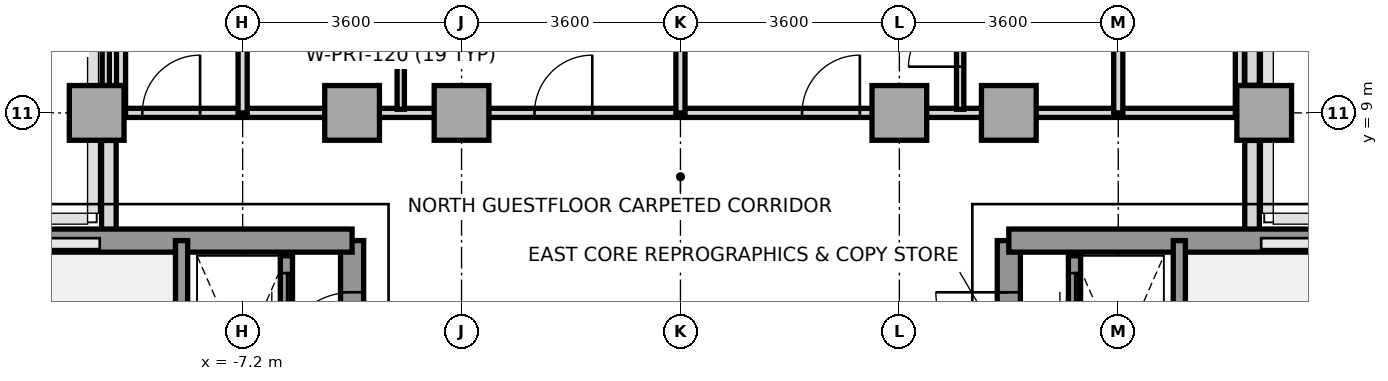
"""IFC4 building model, lengths in metres.
Left out: names, types, materials, properties, quantities, classifications, styles, units other than length and angle.
Written with IfcOpenShell. Run it as: python <this file> out.ifc"""

import sys

from ifc_helpers import new_model, si_unit, direction, frame, frame_2d, origin, origin_2d, place, context, subcontext, project, spatial, rectangle, extrude, source, transform, mapped, element, fill, save


model = new_model("IFC4")
c1 = context("Model", 3, precision=1e-05, world=origin(), true_north=direction((0.0, 1.0)))
c2 = subcontext(c1, "Body", "Model", "MODEL_VIEW")
j1 = project(units=[si_unit("LENGTHUNIT", "METRE"), si_unit("PLANEANGLEUNIT", "RADIAN")], contexts=[c1])
p1 = place(None, origin())
s1 = spatial("IfcSite", under=j1, at=p1, CompositionType="ELEMENT")
p2 = place(p1, origin())
s2 = spatial("IfcBuilding", under=s1, at=p2, CompositionType="ELEMENT")
p3 = place(p2, frame((0.0, 0.0, 187.6)))
s3 = spatial("IfcBuildingStorey", under=s2, at=p3, CompositionType="ELEMENT", Elevation=187.6)
m1 = source(origin(), c2, "Body", "SweptSolid", [
    extrude(rectangle(XDim=0.9, YDim=0.9, at=origin_2d()), origin(), (0.0, 0.0, 1.0), 3.2),
])
for number, where, z_axis, x_axis in (
    (1, (-9.6, 9.0, 0.0), (0.0, 0.0, 1.0), (1.0, 0.0, 0.0)),
    (2, (-5.4, 9.0, 0.0), (0.0, 0.0, 1.0), (1.0, 0.0, 0.0)),
    (3, (-3.6, 9.0, 0.0), (0.0, 0.0, 1.0), (1.0, 0.0, 0.0)),
    (4, (3.6, 9.0, 0.0), (0.0, 0.0, 1.0), (1.0, 0.0, 0.0)),
    (5, (5.4, 9.0, 0.0), (0.0, 0.0, 1.0), (1.0, 0.0, 0.0)),
    (6, (9.6, 9.0, 0.0), (0.0, 0.0, 1.0), (1.0, 0.0, 0.0)),
):
    element("IfcColumn", number, at=place(p3, frame(where, z_axis=z_axis, x_axis=x_axis)), inside=s3, PredefinedType="COLUMN", context=c2, shape_type="MappedRepresentation", body=[
        mapped(m1, transform((0.0, 0.0, 0.0), x_axis=(1.0, 0.0, 0.0), y_axis=(0.0, 1.0, 0.0), z_axis=(0.0, 0.0, 1.0), scale=1.0)),
    ])
p4 = place(p3, frame((-9.4, 6.953, 0.0), z_axis=(0.0, 0.0, 1.0), x_axis=(0.0, 1.0, 0.0)))
e7 = element("IfcWall", 7, at=p4, inside=s3, PredefinedType="PARAPET", context=c2, shape_type="SweptSolid", body=[
    extrude(rectangle(XDim=1.594, YDim=0.24, at=frame_2d((0.797, 0.0))), origin(), (0.0, 0.0, 1.0), 1.15),
])
p5 = place(p3, frame((9.4, 15.358, 0.0), z_axis=(0.0, 0.0, 1.0), x_axis=(0.0, -1.0, 0.0)))
e8 = element("IfcWall", 8, at=p5, inside=s3, PredefinedType="PARAPET", context=c2, shape_type="SweptSolid", body=[
    extrude(rectangle(XDim=5.905, YDim=0.24, at=frame_2d((2.952, 0.0))), origin(), (0.0, 0.0, 1.0), 1.15),
])
p6 = place(p3, frame((9.4, 8.547, 0.0), z_axis=(0.0, 0.0, 1.0), x_axis=(0.0, -1.0, 0.0)))
e9 = element("IfcWall", 9, at=p6, inside=s3, PredefinedType="PARAPET", context=c2, shape_type="SweptSolid", body=[
    extrude(rectangle(XDim=1.594, YDim=0.24, at=frame_2d((0.797, 0.0))), origin(), (0.0, 0.0, 1.0), 1.15),
])
p7 = place(p3, frame((-5.4, -5.6, 0.0), z_axis=(0.0, 0.0, 1.0), x_axis=(0.0, 1.0, 0.0)))
e10 = element("IfcWall", 10, at=p7, inside=s3, PredefinedType="SHEAR", context=c2, shape_type="SweptSolid", body=[
    extrude(rectangle(XDim=12.5, YDim=0.38, at=frame_2d((6.25, 0.0))), origin(), (0.0, 0.0, 1.0), 3.2),
])
p8 = place(p7, frame((4.55, 0.0, 0.0)))
e11 = element("IfcOpeningElement", 11, at=p8, cuts=e10, PredefinedType="OPENING", context=c2, shape_type="SweptSolid", body=[
    extrude(rectangle(XDim=1.2, YDim=2.2, at=frame_2d((0.6, 1.1))), frame((0.0, 0.2, 0.0), z_axis=(0.0, -1.0, 0.0), x_axis=(1.0, 0.0, 0.0)), (0.0, 0.0, 1.0), 0.4),
])
p9 = place(p7, frame((10.45, 0.0, 0.0)))
e12 = element("IfcOpeningElement", 12, at=p9, cuts=e10, PredefinedType="OPENING", context=c2, shape_type="SweptSolid", body=[
    extrude(rectangle(XDim=1.2, YDim=2.2, at=frame_2d((0.6, 1.1))), frame((0.0, 0.2, 0.0), z_axis=(0.0, -1.0, 0.0), x_axis=(1.0, 0.0, 0.0)), (0.0, 0.0, 1.0), 0.4),
])
p10 = place(p7, frame((6.86, 0.0, 0.0)))
e13 = element("IfcOpeningElement", 13, at=p10, cuts=e10, PredefinedType="OPENING", context=c2, shape_type="SweptSolid", body=[
    extrude(rectangle(XDim=0.8, YDim=2.1, at=frame_2d((0.4, 1.05))), frame((0.0, 0.2, 0.0), z_axis=(0.0, -1.0, 0.0), x_axis=(1.0, 0.0, 0.0)), (0.0, 0.0, 1.0), 0.4),
])
p11 = place(p3, frame((-11.356, 6.9, 0.0), z_axis=(0.0, 0.0, 1.0), x_axis=(1.0, 0.0, 0.0)))
e14 = element("IfcWall", 14, at=p11, inside=s3, PredefinedType="SHEAR", context=c2, shape_type="SweptSolid", body=[
    extrude(rectangle(XDim=5.956, YDim=0.38, at=frame_2d((2.978, 0.0))), origin(), (0.0, 0.0, 1.0), 3.2),
])
p12 = place(p3, frame((-8.204, -0.016, 0.0), z_axis=(0.0, 0.0, 1.0), x_axis=(0.0, 1.0, 0.0)))
e15 = element("IfcWall", 15, at=p12, inside=s3, PredefinedType="SOLIDWALL", context=c2, shape_type="SweptSolid", body=[
    extrude(rectangle(XDim=6.916, YDim=0.2, at=frame_2d((3.458, 0.0))), origin(), (0.0, 0.0, 1.0), 3.2),
])
p13 = place(p12, frame((0.2, 0.0, 0.0)))
e16 = element("IfcOpeningElement", 16, at=p13, cuts=e15, PredefinedType="OPENING", context=c2, shape_type="SweptSolid", body=[
    extrude(rectangle(XDim=1.2, YDim=2.2, at=frame_2d((0.6, 1.1))), frame((0.0, 0.11, 0.0), z_axis=(0.0, -1.0, 0.0), x_axis=(1.0, 0.0, 0.0)), (0.0, 0.0, 1.0), 0.22),
])
p14 = place(p3, frame((5.4, -5.6, 0.0), z_axis=(0.0, 0.0, 1.0), x_axis=(0.0, 1.0, 0.0)))
e17 = element("IfcWall", 17, at=p14, inside=s3, PredefinedType="SHEAR", context=c2, shape_type="SweptSolid", body=[
    extrude(rectangle(XDim=12.5, YDim=0.38, at=frame_2d((6.25, 0.0))), origin(), (0.0, 0.0, 1.0), 3.2),
])
p15 = place(p14, frame((4.55, 0.0, 0.0)))
e18 = element("IfcOpeningElement", 18, at=p15, cuts=e17, PredefinedType="OPENING", context=c2, shape_type="SweptSolid", body=[
    extrude(rectangle(XDim=1.2, YDim=2.2, at=frame_2d((0.6, 1.1))), frame((0.0, 0.2, 0.0), z_axis=(0.0, -1.0, 0.0), x_axis=(1.0, 0.0, 0.0)), (0.0, 0.0, 1.0), 0.4),
])
p16 = place(p14, frame((10.45, 0.0, 0.0)))
e19 = element("IfcOpeningElement", 19, at=p16, cuts=e17, PredefinedType="OPENING", context=c2, shape_type="SweptSolid", body=[
    extrude(rectangle(XDim=1.2, YDim=2.2, at=frame_2d((0.6, 1.1))), frame((0.0, 0.2, 0.0), z_axis=(0.0, -1.0, 0.0), x_axis=(1.0, 0.0, 0.0)), (0.0, 0.0, 1.0), 0.4),
])
p17 = place(p14, frame((6.86, 0.0, 0.0)))
e20 = element("IfcOpeningElement", 20, at=p17, cuts=e17, PredefinedType="OPENING", context=c2, shape_type="SweptSolid", body=[
    extrude(rectangle(XDim=0.8, YDim=2.1, at=frame_2d((0.4, 1.05))), frame((0.0, 0.2, 0.0), z_axis=(0.0, -1.0, 0.0), x_axis=(1.0, 0.0, 0.0)), (0.0, 0.0, 1.0), 0.4),
])
p18 = place(p14, frame((7.88, 0.0, 0.0)))
e21 = element("IfcOpeningElement", 21, at=p18, cuts=e17, PredefinedType="OPENING", context=c2, shape_type="SweptSolid", body=[
    extrude(rectangle(XDim=0.8, YDim=2.1, at=frame_2d((0.4, 1.05))), frame((0.0, 0.2, 0.0), z_axis=(0.0, -1.0, 0.0), x_axis=(1.0, 0.0, 0.0)), (0.0, 0.0, 1.0), 0.4),
])
p19 = place(p3, frame((5.4, 6.9, 0.0), z_axis=(0.0, 0.0, 1.0), x_axis=(1.0, 0.0, 0.0)))
e22 = element("IfcWall", 22, at=p19, inside=s3, PredefinedType="SHEAR", context=c2, shape_type="SweptSolid", body=[
    extrude(rectangle(XDim=5.956, YDim=0.38, at=frame_2d((2.978, 0.0))), origin(), (0.0, 0.0, 1.0), 3.2),
])
p20 = place(p3, frame((8.204, -0.016, 0.0), z_axis=(0.0, 0.0, 1.0), x_axis=(0.0, 1.0, 0.0)))
e23 = element("IfcWall", 23, at=p20, inside=s3, PredefinedType="SOLIDWALL", context=c2, shape_type="SweptSolid", body=[
    extrude(rectangle(XDim=6.916, YDim=0.2, at=frame_2d((3.458, 0.0))), origin(), (0.0, 0.0, 1.0), 3.2),
])
p21 = place(p20, frame((0.2, 0.0, 0.0)))
e24 = element("IfcOpeningElement", 24, at=p21, cuts=e23, PredefinedType="OPENING", context=c2, shape_type="SweptSolid", body=[
    extrude(rectangle(XDim=1.2, YDim=2.2, at=frame_2d((0.6, 1.1))), frame((0.0, 0.11, 0.0), z_axis=(0.0, -1.0, 0.0), x_axis=(1.0, 0.0, 0.0)), (0.0, 0.0, 1.0), 0.22),
])
p22 = place(p3, frame((-6.48, 4.98, 0.0), z_axis=(0.0, 0.0, 1.0), x_axis=(0.0, 1.0, 0.0)))
e25 = element("IfcWall", 25, at=p22, inside=s3, PredefinedType="SOLIDWALL", context=c2, shape_type="SweptSolid", body=[
    extrude(rectangle(XDim=1.67, YDim=0.2, at=frame_2d((0.835, 0.0))), origin(), (0.0, 0.0, 1.0), 3.2),
])
p23 = place(p22, frame((0.285, 0.0, 0.0)))
e26 = element("IfcOpeningElement", 26, at=p23, cuts=e25, PredefinedType="OPENING", context=c2, shape_type="SweptSolid", body=[
    extrude(rectangle(XDim=1.1, YDim=2.2, at=frame_2d((0.55, 1.1))), frame((0.0, 0.11, 0.0), z_axis=(0.0, -1.0, 0.0), x_axis=(1.0, 0.0, 0.0)), (0.0, 0.0, 1.0), 0.22),
])
p24 = place(p3, frame((6.48, 4.98, 0.0), z_axis=(0.0, 0.0, 1.0), x_axis=(0.0, 1.0, 0.0)))
e27 = element("IfcWall", 27, at=p24, inside=s3, PredefinedType="SOLIDWALL", context=c2, shape_type="SweptSolid", body=[
    extrude(rectangle(XDim=1.67, YDim=0.2, at=frame_2d((0.835, 0.0))), origin(), (0.0, 0.0, 1.0), 3.2),
])
p25 = place(p24, frame((0.285, 0.0, 0.0)))
e28 = element("IfcOpeningElement", 28, at=p25, cuts=e27, PredefinedType="OPENING", context=c2, shape_type="SweptSolid", body=[
    extrude(rectangle(XDim=1.1, YDim=2.2, at=frame_2d((0.55, 1.1))), frame((0.0, 0.11, 0.0), z_axis=(0.0, -1.0, 0.0), x_axis=(1.0, 0.0, 0.0)), (0.0, 0.0, 1.0), 0.22),
])
p26 = place(p3, frame((-9.55, 9.0, 0.0), z_axis=(0.0, 0.0, 1.0), x_axis=(1.0, 0.0, 0.0)))
e29 = element("IfcWall", 29, at=p26, inside=s3, PredefinedType="PARTITIONING", context=c2, shape_type="SweptSolid", body=[
    extrude(rectangle(XDim=19.1, YDim=0.15, at=frame_2d((9.55, 0.0))), origin(), (0.0, 0.0, 1.0), 2.75),
])
p27 = place(p26, frame((0.7, 0.0, 0.0)))
e30 = element("IfcOpeningElement", 30, at=p27, cuts=e29, PredefinedType="OPENING", context=c2, shape_type="SweptSolid", body=[
    extrude(rectangle(XDim=0.95, YDim=2.15, at=frame_2d((0.475, 1.075))), frame((0.0, 0.085, 0.0), z_axis=(0.0, -1.0, 0.0), x_axis=(1.0, 0.0, 0.0)), (0.0, 0.0, 1.0), 0.17),
])
p28 = place(p26, frame((7.15, 0.0, 0.0)))
e31 = element("IfcOpeningElement", 31, at=p28, cuts=e29, PredefinedType="OPENING", context=c2, shape_type="SweptSolid", body=[
    extrude(rectangle(XDim=0.95, YDim=2.15, at=frame_2d((0.475, 1.075))), frame((0.0, 0.085, 0.0), z_axis=(0.0, -1.0, 0.0), x_axis=(1.0, 0.0, 0.0)), (0.0, 0.0, 1.0), 0.17),
])
p29 = place(p26, frame((11.55, 0.0, 0.0)))
e32 = element("IfcOpeningElement", 32, at=p29, cuts=e29, PredefinedType="OPENING", context=c2, shape_type="SweptSolid", body=[
    extrude(rectangle(XDim=0.95, YDim=2.15, at=frame_2d((0.475, 1.075))), frame((0.0, 0.085, 0.0), z_axis=(0.0, -1.0, 0.0), x_axis=(1.0, 0.0, 0.0)), (0.0, 0.0, 1.0), 0.17),
])
for number, where, z_axis, x_axis in (
    (33, (-9.2, 9.0, 0.0), (0.0, 0.0, 1.0), (0.0, 1.0, 0.0)),
    (34, (9.2, 9.0, 0.0), (0.0, 0.0, 1.0), (0.0, 1.0, 0.0)),
):
    element("IfcWall", number, at=place(p3, frame(where, z_axis=z_axis, x_axis=x_axis)), inside=s3, PredefinedType="PARTITIONING", context=c2, shape_type="SweptSolid", body=[
        extrude(rectangle(XDim=6.68, YDim=0.15, at=frame_2d((3.34, 0.0))), origin(), (0.0, 0.0, 1.0), 2.75),
    ])
p30 = place(p3, frame((-7.2, 9.0, 0.0), z_axis=(0.0, 0.0, 1.0), x_axis=(0.0, 1.0, 0.0)))
e35 = element("IfcWall", 35, at=p30, inside=s3, PredefinedType="PARTITIONING", context=c2, shape_type="SweptSolid", body=[
    extrude(rectangle(XDim=14.4, YDim=0.15, at=frame_2d((7.2, 0.0))), origin(), (0.0, 0.0, 1.0), 2.75),
])
p31 = place(p3, frame((0.0, 9.0, 0.0), z_axis=(0.0, 0.0, 1.0), x_axis=(0.0, 1.0, 0.0)))
e36 = element("IfcWall", 36, at=p31, inside=s3, PredefinedType="PARTITIONING", context=c2, shape_type="SweptSolid", body=[
    extrude(rectangle(XDim=15.65, YDim=0.15, at=frame_2d((7.825, 0.0))), origin(), (0.0, 0.0, 1.0), 2.75),
])
p32 = place(p3, frame((7.2, 9.0, 0.0), z_axis=(0.0, 0.0, 1.0), x_axis=(0.0, 1.0, 0.0)))
e37 = element("IfcWall", 37, at=p32, inside=s3, PredefinedType="PARTITIONING", context=c2, shape_type="SweptSolid", body=[
    extrude(rectangle(XDim=14.4, YDim=0.15, at=frame_2d((7.2, 0.0))), origin(), (0.0, 0.0, 1.0), 2.75),
])
p33 = place(p3, frame((-9.45, 9.0, 0.0), z_axis=(0.0, 0.0, 1.0), x_axis=(0.0, 1.0, 0.0)))
e38 = element("IfcWall", 38, at=p33, inside=s3, PredefinedType="PARTITIONING", context=c2, shape_type="SweptSolid", body=[
    extrude(rectangle(XDim=4.0, YDim=0.12, at=frame_2d((2.0, 0.0))), origin(), (0.0, 0.0, 1.0), 3.2),
])
p34 = place(p3, frame((-4.6, 9.06, 0.0), z_axis=(0.0, 0.0, 1.0), x_axis=(0.0, 1.0, 0.0)))
e39 = element("IfcWall", 39, at=p34, inside=s3, PredefinedType="PARTITIONING", context=c2, shape_type="SweptSolid", body=[
    extrude(rectangle(XDim=2.64, YDim=0.12, at=frame_2d((1.32, 0.0))), origin(), (0.0, 0.0, 1.0), 3.2),
])
p35 = place(p34, frame((0.7, 0.0, 0.0)))
e40 = element("IfcOpeningElement", 40, at=p35, cuts=e39, PredefinedType="OPENING", context=c2, shape_type="SweptSolid", body=[
    extrude(rectangle(XDim=0.85, YDim=2.1, at=frame_2d((0.425, 1.05))), frame((0.0, 0.07, 0.0), z_axis=(0.0, -1.0, 0.0), x_axis=(1.0, 0.0, 0.0)), (0.0, 0.0, 1.0), 0.14),
])
p36 = place(p3, frame((4.6, 9.06, 0.0), z_axis=(0.0, 0.0, 1.0), x_axis=(0.0, 1.0, 0.0)))
e41 = element("IfcWall", 41, at=p36, inside=s3, PredefinedType="PARTITIONING", context=c2, shape_type="SweptSolid", body=[
    extrude(rectangle(XDim=2.64, YDim=0.12, at=frame_2d((1.32, 0.0))), origin(), (0.0, 0.0, 1.0), 3.2),
])
p37 = place(p36, frame((0.7, 0.0, 0.0)))
e42 = element("IfcOpeningElement", 42, at=p37, cuts=e41, PredefinedType="OPENING", context=c2, shape_type="SweptSolid", body=[
    extrude(rectangle(XDim=0.85, YDim=2.1, at=frame_2d((0.425, 1.05))), frame((0.0, 0.07, 0.0), z_axis=(0.0, -1.0, 0.0), x_axis=(1.0, 0.0, 0.0)), (0.0, 0.0, 1.0), 0.14),
])
m2 = source(origin(), c2, "Body", "SweptSolid", [
    extrude(rectangle(XDim=1.2, YDim=2.2, at=frame_2d((0.6, 1.1))), frame((0.0, 0.025, 0.0), z_axis=(0.0, -1.0, 0.0), x_axis=(1.0, 0.0, 0.0)), (0.0, 0.0, 1.0), 0.05),
])
p38 = place(p9, origin())
e43 = element("IfcDoor", 43, at=p38, inside=s3, OperationType="SINGLE_SWING_LEFT", PredefinedType="DOOR", context=c2, shape_type="MappedRepresentation", body=[
    mapped(m2, transform((0.0, 0.0, 0.0), x_axis=(1.0, 0.0, 0.0), y_axis=(0.0, 1.0, 0.0), z_axis=(0.0, 0.0, 1.0), scale=1.0)),
])
fill(e12, e43)
p39 = place(p16, origin())
e44 = element("IfcDoor", 44, at=p39, inside=s3, OperationType="SINGLE_SWING_RIGHT", PredefinedType="DOOR", context=c2, shape_type="MappedRepresentation", body=[
    mapped(m2, transform((0.0, 0.0, 0.0), x_axis=(1.0, 0.0, 0.0), y_axis=(0.0, 1.0, 0.0), z_axis=(0.0, 0.0, 1.0), scale=1.0)),
])
fill(e19, e44)
m3 = source(origin(), c2, "Body", "SweptSolid", [
    extrude(rectangle(XDim=1.1, YDim=2.2, at=frame_2d((0.55, 1.1))), frame((0.0, 0.025, 0.0), z_axis=(0.0, -1.0, 0.0), x_axis=(1.0, 0.0, 0.0)), (0.0, 0.0, 1.0), 0.05),
])
p40 = place(p23, origin())
e45 = element("IfcDoor", 45, at=p40, inside=s3, OperationType="SLIDING_TO_LEFT", PredefinedType="DOOR", context=c2, shape_type="MappedRepresentation", body=[
    mapped(m3, transform((0.0, 0.0, 0.0), x_axis=(1.0, 0.0, 0.0), y_axis=(0.0, 1.0, 0.0), z_axis=(0.0, 0.0, 1.0), scale=1.0)),
])
fill(e26, e45)
p41 = place(p25, origin())
e46 = element("IfcDoor", 46, at=p41, inside=s3, OperationType="SLIDING_TO_LEFT", PredefinedType="DOOR", context=c2, shape_type="MappedRepresentation", body=[
    mapped(m3, transform((0.0, 0.0, 0.0), x_axis=(1.0, 0.0, 0.0), y_axis=(0.0, 1.0, 0.0), z_axis=(0.0, 0.0, 1.0), scale=1.0)),
])
fill(e28, e46)
m4 = source(origin(), c2, "Body", "SweptSolid", [
    extrude(rectangle(XDim=0.95, YDim=2.15, at=frame_2d((0.475, 1.075))), frame((0.0, 0.025, 0.0), z_axis=(0.0, -1.0, 0.0), x_axis=(1.0, 0.0, 0.0)), (0.0, 0.0, 1.0), 0.05),
])
p42 = place(p27, origin())
e47 = element("IfcDoor", 47, at=p42, inside=s3, OperationType="SINGLE_SWING_RIGHT", PredefinedType="DOOR", context=c2, shape_type="MappedRepresentation", body=[
    mapped(m4, transform((0.0, 0.0, 0.0), x_axis=(1.0, 0.0, 0.0), y_axis=(0.0, 1.0, 0.0), z_axis=(0.0, 0.0, 1.0), scale=1.0)),
])
fill(e30, e47)
m5 = source(origin(), c2, "Body", "SweptSolid", [
    extrude(rectangle(XDim=0.85, YDim=2.1, at=frame_2d((0.425, 1.05))), frame((0.0, 0.025, 0.0), z_axis=(0.0, -1.0, 0.0), x_axis=(1.0, 0.0, 0.0)), (0.0, 0.0, 1.0), 0.05),
])
p43 = place(p35, origin())
e48 = element("IfcDoor", 48, at=p43, inside=s3, OperationType="SINGLE_SWING_LEFT", PredefinedType="DOOR", context=c2, shape_type="MappedRepresentation", body=[
    mapped(m5, transform((0.0, 0.0, 0.0), x_axis=(1.0, 0.0, 0.0), y_axis=(0.0, 1.0, 0.0), z_axis=(0.0, 0.0, 1.0), scale=1.0)),
])
fill(e40, e48)
p44 = place(p28, origin())
e49 = element("IfcDoor", 49, at=p44, inside=s3, OperationType="SINGLE_SWING_RIGHT", PredefinedType="DOOR", context=c2, shape_type="MappedRepresentation", body=[
    mapped(m4, transform((0.0, 0.0, 0.0), x_axis=(1.0, 0.0, 0.0), y_axis=(0.0, 1.0, 0.0), z_axis=(0.0, 0.0, 1.0), scale=1.0)),
])
fill(e31, e49)
p45 = place(p37, origin())
e50 = element("IfcDoor", 50, at=p45, inside=s3, OperationType="SINGLE_SWING_LEFT", PredefinedType="DOOR", context=c2, shape_type="MappedRepresentation", body=[
    mapped(m5, transform((0.0, 0.0, 0.0), x_axis=(1.0, 0.0, 0.0), y_axis=(0.0, 1.0, 0.0), z_axis=(0.0, 0.0, 1.0), scale=1.0)),
])
fill(e42, e50)
p46 = place(p29, origin())
e51 = element("IfcDoor", 51, at=p46, inside=s3, OperationType="SINGLE_SWING_RIGHT", PredefinedType="DOOR", context=c2, shape_type="MappedRepresentation", body=[
    mapped(m4, transform((0.0, 0.0, 0.0), x_axis=(1.0, 0.0, 0.0), y_axis=(0.0, 1.0, 0.0), z_axis=(0.0, 0.0, 1.0), scale=1.0)),
])
fill(e32, e51)
save(model, sys.argv[1])
